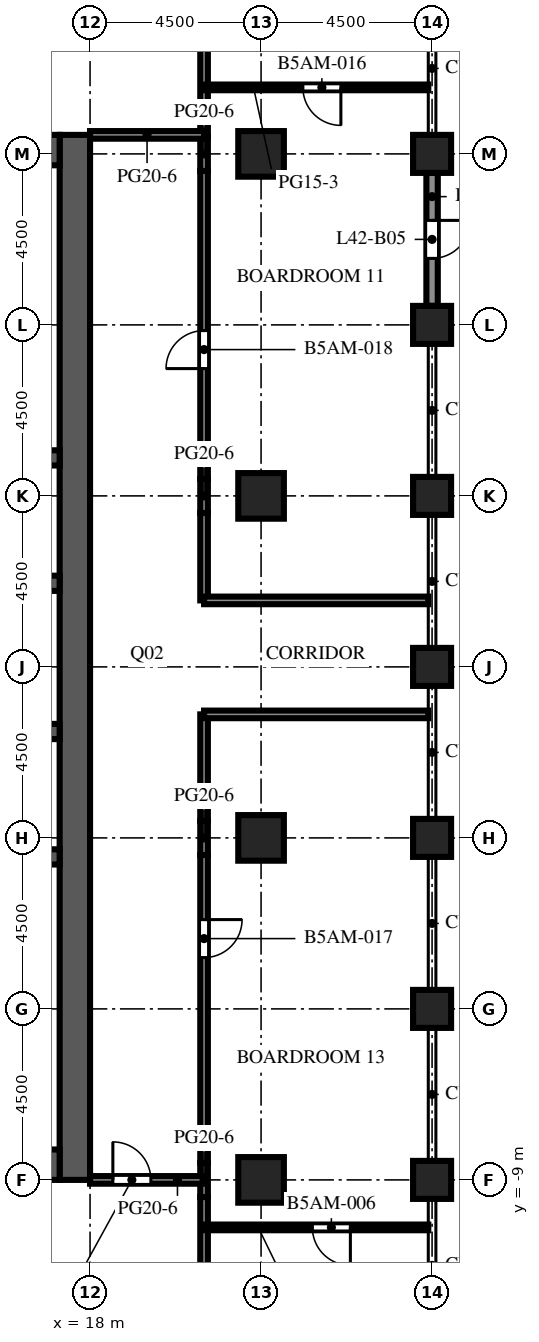
"""IFC4 building model, lengths in metres.
Left out: names, types, materials, properties, quantities, classifications, styles, units other than length and angle.
Written with IfcOpenShell. Run it as: python <this file> out.ifc"""

import sys

from ifc_helpers import new_model, si_unit, direction, frame, frame_2d, origin, origin_2d, place, context, subcontext, project, spatial, rectangle, extrude, element, fill, save


model = new_model("IFC4")
c1 = context("Model", 3, precision=1e-05, world=origin(), true_north=direction((0.0, 1.0)))
c2 = subcontext(c1, "Body", "Model", "MODEL_VIEW")
j1 = project(units=[si_unit("LENGTHUNIT", "METRE"), si_unit("PLANEANGLEUNIT", "RADIAN")], contexts=[c1])
p1 = place(None, origin())
s1 = spatial("IfcSite", under=j1, at=p1, CompositionType="ELEMENT")
p2 = place(p1, origin())
s2 = spatial("IfcBuilding", under=s1, at=p2, CompositionType="ELEMENT")
p3 = place(p2, frame((0.0, 0.0, 185.5)))
s3 = spatial("IfcBuildingStorey", under=s2, at=p3, CompositionType="ELEMENT", Elevation=185.5)
p4 = place(p3, frame((27.0, -9.0, 0.0), z_axis=(0.0, 0.0, 1.0), x_axis=(1.0, 0.0, 0.0)))
e1 = element("IfcColumn", 1, at=p4, inside=s3, PredefinedType="COLUMN", context=c2, shape_type="SweptSolid", body=[
    extrude(rectangle(XDim=1.0, YDim=1.0, at=origin_2d()), origin(), (0.0, 0.0, 1.0), 5.55),
])
p5 = place(p3, frame((27.0, -4.5, 0.0), z_axis=(0.0, 0.0, 1.0), x_axis=(1.0, 0.0, 0.0)))
e2 = element("IfcColumn", 2, at=p5, inside=s3, PredefinedType="COLUMN", context=c2, shape_type="SweptSolid", body=[
    extrude(rectangle(XDim=1.0, YDim=1.0, at=origin_2d()), origin(), (0.0, 0.0, 1.0), 6.0),
])
p6 = place(p3, frame((27.0, 0.0, 0.0), z_axis=(0.0, 0.0, 1.0), x_axis=(1.0, 0.0, 0.0)))
e3 = element("IfcColumn", 3, at=p6, inside=s3, PredefinedType="COLUMN", context=c2, shape_type="SweptSolid", body=[
    extrude(rectangle(XDim=1.0, YDim=1.0, at=origin_2d()), origin(), (0.0, 0.0, 1.0), 5.55),
])
p7 = place(p3, frame((27.0, 4.5, 0.0), z_axis=(0.0, 0.0, 1.0), x_axis=(1.0, 0.0, 0.0)))
e4 = element("IfcColumn", 4, at=p7, inside=s3, PredefinedType="COLUMN", context=c2, shape_type="SweptSolid", body=[
    extrude(rectangle(XDim=1.0, YDim=1.0, at=origin_2d()), origin(), (0.0, 0.0, 1.0), 6.0),
])
p8 = place(p3, frame((27.0, 9.0, 0.0), z_axis=(0.0, 0.0, 1.0), x_axis=(1.0, 0.0, 0.0)))
e5 = element("IfcColumn", 5, at=p8, inside=s3, PredefinedType="COLUMN", context=c2, shape_type="SweptSolid", body=[
    extrude(rectangle(XDim=1.0, YDim=1.0, at=origin_2d()), origin(), (0.0, 0.0, 1.0), 5.55),
])
p9 = place(p3, frame((27.0, 13.5, 0.0), z_axis=(0.0, 0.0, 1.0), x_axis=(1.0, 0.0, 0.0)))
e6 = element("IfcColumn", 6, at=p9, inside=s3, PredefinedType="COLUMN", context=c2, shape_type="SweptSolid", body=[
    extrude(rectangle(XDim=1.0, YDim=1.0, at=origin_2d()), origin(), (0.0, 0.0, 1.0), 6.0),
])
p10 = place(p3, frame((27.0, 18.0, 0.0), z_axis=(0.0, 0.0, 1.0), x_axis=(1.0, 0.0, 0.0)))
e7 = element("IfcColumn", 7, at=p10, inside=s3, PredefinedType="COLUMN", context=c2, shape_type="SweptSolid", body=[
    extrude(rectangle(XDim=1.0, YDim=1.0, at=origin_2d()), origin(), (0.0, 0.0, 1.0), 5.55),
])
for number, where, z_axis, x_axis in (
    (8, (22.5, -9.0, 0.0), (0.0, 0.0, 1.0), (1.0, 0.0, 0.0)),
    (9, (22.5, 0.0, 0.0), (0.0, 0.0, 1.0), (1.0, 0.0, 0.0)),
    (10, (22.5, 9.0, 0.0), (0.0, 0.0, 1.0), (1.0, 0.0, 0.0)),
    (11, (22.5, 18.0, 0.0), (0.0, 0.0, 1.0), (1.0, 0.0, 0.0)),
):
    element("IfcColumn", number, at=place(p3, frame(where, z_axis=z_axis, x_axis=x_axis)), inside=s3, PredefinedType="COLUMN", context=c2, shape_type="SweptSolid", body=[
        extrude(rectangle(XDim=1.2, YDim=1.2, at=origin_2d()), origin(), (0.0, 0.0, 1.0), 5.55),
    ])
p11 = place(p3, frame((17.6, -9.0, 0.0), z_axis=(0.0, 0.0, 1.0), x_axis=(0.0, 1.0, 0.0)))
e12 = element("IfcWall", 12, at=p11, inside=s3, PredefinedType="SHEAR", context=c2, shape_type="SweptSolid", body=[
    extrude(rectangle(XDim=27.5, YDim=0.8, at=frame_2d((13.75, 0.0))), origin(), (0.0, 0.0, 1.0), 6.0),
])
p12 = place(p11, frame((12.55, 0.0, 0.0)))
e13 = element("IfcOpeningElement", 13, at=p12, cuts=e12, PredefinedType="OPENING", context=c2, shape_type="SweptSolid", body=[
    extrude(rectangle(XDim=2.4, YDim=2.4, at=frame_2d((1.2, 1.2))), frame((0.0, 0.41, 0.0), z_axis=(0.0, -1.0, 0.0), x_axis=(1.0, 0.0, 0.0)), (0.0, 0.0, 1.0), 0.82),
])
p13 = place(p11, frame((6.825, 0.0, 0.0)))
e14 = element("IfcOpeningElement", 14, at=p13, cuts=e12, PredefinedType="OPENING", context=c2, shape_type="SweptSolid", body=[
    extrude(rectangle(XDim=1.2, YDim=2.1, at=frame_2d((0.6, 1.05))), frame((0.0, 0.41, 0.0), z_axis=(0.0, -1.0, 0.0), x_axis=(1.0, 0.0, 0.0)), (0.0, 0.0, 1.0), 0.82),
])
p14 = place(p11, frame((19.475, 0.0, 0.0)))
e15 = element("IfcOpeningElement", 15, at=p14, cuts=e12, PredefinedType="OPENING", context=c2, shape_type="SweptSolid", body=[
    extrude(rectangle(XDim=1.2, YDim=2.1, at=frame_2d((0.6, 1.05))), frame((0.0, 0.41, 0.0), z_axis=(0.0, -1.0, 0.0), x_axis=(1.0, 0.0, 0.0)), (0.0, 0.0, 1.0), 0.82),
])
for number, where, z_axis, x_axis in (
    (16, (6.8, -8.6, 0.0), (0.0, 0.0, 1.0), (1.0, 0.0, 0.0)),
    (17, (6.8, 18.1, 0.0), (0.0, 0.0, 1.0), (1.0, 0.0, 0.0)),
):
    element("IfcWall", number, at=place(p3, frame(where, z_axis=z_axis, x_axis=x_axis)), inside=s3, PredefinedType="SHEAR", context=c2, shape_type="SweptSolid", body=[
        extrude(rectangle(XDim=10.4, YDim=0.8, at=frame_2d((5.2, 0.0))), origin(), (0.0, 0.0, 1.0), 6.0),
    ])
p15 = place(p3, frame((6.8, -0.5, 0.0), z_axis=(0.0, 0.0, 1.0), x_axis=(1.0, 0.0, 0.0)))
e18 = element("IfcWall", 18, at=p15, inside=s3, PredefinedType="SHEAR", context=c2, shape_type="SweptSolid", body=[
    extrude(rectangle(XDim=10.4, YDim=0.4, at=frame_2d((5.2, 0.0))), origin(), (0.0, 0.0, 1.0), 6.0),
])
p16 = place(p3, frame((6.8, 2.8, 0.0), z_axis=(0.0, 0.0, 1.0), x_axis=(1.0, 0.0, 0.0)))
e19 = element("IfcWall", 19, at=p16, inside=s3, PredefinedType="SHEAR", context=c2, shape_type="SweptSolid", body=[
    extrude(rectangle(XDim=10.4, YDim=0.4, at=frame_2d((5.2, 0.0))), origin(), (0.0, 0.0, 1.0), 6.0),
])
p17 = place(p16, frame((0.738, 0.0, 0.0)))
e20 = element("IfcOpeningElement", 20, at=p17, cuts=e19, PredefinedType="OPENING", context=c2, shape_type="SweptSolid", body=[
    extrude(rectangle(XDim=1.1, YDim=2.1, at=frame_2d((0.55, 1.05))), frame((0.0, 0.21, 0.0), z_axis=(0.0, -1.0, 0.0), x_axis=(1.0, 0.0, 0.0)), (0.0, 0.0, 1.0), 0.42),
])
p18 = place(p16, frame((3.337, 0.0, 0.0)))
e21 = element("IfcOpeningElement", 21, at=p18, cuts=e19, PredefinedType="OPENING", context=c2, shape_type="SweptSolid", body=[
    extrude(rectangle(XDim=1.1, YDim=2.1, at=frame_2d((0.55, 1.05))), frame((0.0, 0.21, 0.0), z_axis=(0.0, -1.0, 0.0), x_axis=(1.0, 0.0, 0.0)), (0.0, 0.0, 1.0), 0.42),
])
p19 = place(p16, frame((6.012, 0.0, 0.0)))
e22 = element("IfcOpeningElement", 22, at=p19, cuts=e19, PredefinedType="OPENING", context=c2, shape_type="SweptSolid", body=[
    extrude(rectangle(XDim=1.0, YDim=2.1, at=frame_2d((0.5, 1.05))), frame((0.0, 0.21, 0.0), z_axis=(0.0, -1.0, 0.0), x_axis=(1.0, 0.0, 0.0)), (0.0, 0.0, 1.0), 0.42),
])
p20 = place(p16, frame((8.613, 0.0, 0.0)))
e23 = element("IfcOpeningElement", 23, at=p20, cuts=e19, PredefinedType="OPENING", context=c2, shape_type="SweptSolid", body=[
    extrude(rectangle(XDim=1.0, YDim=2.1, at=frame_2d((0.5, 1.05))), frame((0.0, 0.21, 0.0), z_axis=(0.0, -1.0, 0.0), x_axis=(1.0, 0.0, 0.0)), (0.0, 0.0, 1.0), 0.42),
])
p21 = place(p3, frame((6.8, 6.7, 0.0), z_axis=(0.0, 0.0, 1.0), x_axis=(1.0, 0.0, 0.0)))
e24 = element("IfcWall", 24, at=p21, inside=s3, PredefinedType="SHEAR", context=c2, shape_type="SweptSolid", body=[
    extrude(rectangle(XDim=10.4, YDim=0.4, at=frame_2d((5.2, 0.0))), origin(), (0.0, 0.0, 1.0), 6.0),
])
p22 = place(p21, frame((3.337, 0.0, 0.0)))
e25 = element("IfcOpeningElement", 25, at=p22, cuts=e24, PredefinedType="OPENING", context=c2, shape_type="SweptSolid", body=[
    extrude(rectangle(XDim=1.1, YDim=2.1, at=frame_2d((0.55, 1.05))), frame((0.0, 0.21, 0.0), z_axis=(0.0, -1.0, 0.0), x_axis=(1.0, 0.0, 0.0)), (0.0, 0.0, 1.0), 0.42),
])
p23 = place(p21, frame((5.962, 0.0, 0.0)))
e26 = element("IfcOpeningElement", 26, at=p23, cuts=e24, PredefinedType="OPENING", context=c2, shape_type="SweptSolid", body=[
    extrude(rectangle(XDim=1.1, YDim=2.1, at=frame_2d((0.55, 1.05))), frame((0.0, 0.21, 0.0), z_axis=(0.0, -1.0, 0.0), x_axis=(1.0, 0.0, 0.0)), (0.0, 0.0, 1.0), 0.42),
])
p24 = place(p21, frame((8.663, 0.0, 0.0)))
e27 = element("IfcOpeningElement", 27, at=p24, cuts=e24, PredefinedType="OPENING", context=c2, shape_type="SweptSolid", body=[
    extrude(rectangle(XDim=1.1, YDim=2.1, at=frame_2d((0.55, 1.05))), frame((0.0, 0.21, 0.0), z_axis=(0.0, -1.0, 0.0), x_axis=(1.0, 0.0, 0.0)), (0.0, 0.0, 1.0), 0.42),
])
p25 = place(p21, frame((0.688, 0.0, 0.0)))
e28 = element("IfcOpeningElement", 28, at=p25, cuts=e24, PredefinedType="OPENING", context=c2, shape_type="SweptSolid", body=[
    extrude(rectangle(XDim=1.0, YDim=2.1, at=frame_2d((0.5, 1.05))), frame((0.0, 0.21, 0.0), z_axis=(0.0, -1.0, 0.0), x_axis=(1.0, 0.0, 0.0)), (0.0, 0.0, 1.0), 0.42),
])
p26 = place(p3, frame((6.8, 10.0, 0.0), z_axis=(0.0, 0.0, 1.0), x_axis=(1.0, 0.0, 0.0)))
e29 = element("IfcWall", 29, at=p26, inside=s3, PredefinedType="SHEAR", context=c2, shape_type="SweptSolid", body=[
    extrude(rectangle(XDim=10.4, YDim=0.4, at=frame_2d((5.2, 0.0))), origin(), (0.0, 0.0, 1.0), 6.0),
])
p27 = place(p3, frame((27.0, 17.5, 0.0), z_axis=(0.0, 0.0, 1.0), x_axis=(0.0, -1.0, 0.0)))
e30 = element("IfcWall", 30, at=p27, inside=s3, PredefinedType="SOLIDWALL", context=c2, shape_type="SweptSolid", body=[
    extrude(rectangle(XDim=3.5, YDim=0.3, at=frame_2d((1.75, 0.0))), origin(), (0.0, 0.0, 1.0), 3.75),
])
p28 = place(p27, frame((1.25, 0.0, 0.0)))
e31 = element("IfcOpeningElement", 31, at=p28, cuts=e30, PredefinedType="OPENING", context=c2, shape_type="SweptSolid", body=[
    extrude(rectangle(XDim=1.0, YDim=2.2, at=frame_2d((0.5, 1.1))), frame((0.0, 0.16, 0.0), z_axis=(0.0, -1.0, 0.0), x_axis=(1.0, 0.0, 0.0)), (0.0, 0.0, 1.0), 0.32),
])
p29 = place(p3, frame((21.0, -17.55, 0.0), z_axis=(0.0, 0.0, 1.0), x_axis=(0.0, 1.0, 0.0)))
e32 = element("IfcWall", 32, at=p29, inside=s3, PredefinedType="PARTITIONING", context=c2, shape_type="SweptSolid", body=[
    extrude(rectangle(XDim=8.1, YDim=0.2, at=frame_2d((4.05, 0.0))), origin(), (0.0, 0.0, 1.0), 5.55),
])
p30 = place(p3, frame((21.0, -9.45, 0.0), z_axis=(0.0, 0.0, 1.0), x_axis=(0.0, 1.0, 0.0)))
e33 = element("IfcWall", 33, at=p30, inside=s3, PredefinedType="PARTITIONING", context=c2, shape_type="SweptSolid", body=[
    extrude(rectangle(XDim=0.9, YDim=0.2, at=frame_2d((0.45, 0.0))), origin(), (0.0, 0.0, 1.0), 3.72),
])
p31 = place(p3, frame((21.0, -0.45, 0.0), z_axis=(0.0, 0.0, 1.0), x_axis=(0.0, -1.0, 0.0)))
e34 = element("IfcWall", 34, at=p31, inside=s3, PredefinedType="PARTITIONING", context=c2, shape_type="SweptSolid", body=[
    extrude(rectangle(XDim=8.1, YDim=0.2, at=frame_2d((4.05, 0.0))), origin(), (0.0, 0.0, 1.0), 5.55),
])
p32 = place(p31, frame((1.7, 0.0, 0.0)))
e35 = element("IfcOpeningElement", 35, at=p32, cuts=e34, PredefinedType="OPENING", context=c2, shape_type="SweptSolid", body=[
    extrude(rectangle(XDim=1.0, YDim=2.1, at=frame_2d((0.5, 1.05))), frame((0.0, 0.11, 0.0), z_axis=(0.0, -1.0, 0.0), x_axis=(1.0, 0.0, 0.0)), (0.0, 0.0, 1.0), 0.22),
])
p33 = place(p3, frame((21.0, -0.45, 0.0), z_axis=(0.0, 0.0, 1.0), x_axis=(0.0, 1.0, 0.0)))
e36 = element("IfcWall", 36, at=p33, inside=s3, PredefinedType="PARTITIONING", context=c2, shape_type="SweptSolid", body=[
    extrude(rectangle(XDim=0.9, YDim=0.2, at=frame_2d((0.45, 0.0))), origin(), (0.0, 0.0, 1.0), 3.72),
])
p34 = place(p3, frame((21.0, 0.45, 0.0), z_axis=(0.0, 0.0, 1.0), x_axis=(0.0, 1.0, 0.0)))
e37 = element("IfcWall", 37, at=p34, inside=s3, PredefinedType="PARTITIONING", context=c2, shape_type="SweptSolid", body=[
    extrude(rectangle(XDim=2.8, YDim=0.2, at=frame_2d((1.4, 0.0))), origin(), (0.0, 0.0, 1.0), 5.55),
])
p35 = place(p3, frame((21.0, 6.25, 0.0), z_axis=(0.0, 0.0, 1.0), x_axis=(0.0, 1.0, 0.0)))
e38 = element("IfcWall", 38, at=p35, inside=s3, PredefinedType="PARTITIONING", context=c2, shape_type="SweptSolid", body=[
    extrude(rectangle(XDim=2.3, YDim=0.2, at=frame_2d((1.15, 0.0))), origin(), (0.0, 0.0, 1.0), 5.55),
])
p36 = place(p3, frame((21.0, 8.55, 0.0), z_axis=(0.0, 0.0, 1.0), x_axis=(0.0, 1.0, 0.0)))
e39 = element("IfcWall", 39, at=p36, inside=s3, PredefinedType="PARTITIONING", context=c2, shape_type="SweptSolid", body=[
    extrude(rectangle(XDim=0.9, YDim=0.2, at=frame_2d((0.45, 0.0))), origin(), (0.0, 0.0, 1.0), 3.72),
])
p37 = place(p3, frame((21.0, 17.55, 0.0), z_axis=(0.0, 0.0, 1.0), x_axis=(0.0, -1.0, 0.0)))
e40 = element("IfcWall", 40, at=p37, inside=s3, PredefinedType="PARTITIONING", context=c2, shape_type="SweptSolid", body=[
    extrude(rectangle(XDim=8.1, YDim=0.2, at=frame_2d((4.05, 0.0))), origin(), (0.0, 0.0, 1.0), 5.55),
])
p38 = place(p37, frame((4.2, 0.0, 0.0)))
e41 = element("IfcOpeningElement", 41, at=p38, cuts=e40, PredefinedType="OPENING", context=c2, shape_type="SweptSolid", body=[
    extrude(rectangle(XDim=1.0, YDim=2.1, at=frame_2d((0.5, 1.05))), frame((0.0, 0.11, 0.0), z_axis=(0.0, -1.0, 0.0), x_axis=(1.0, 0.0, 0.0)), (0.0, 0.0, 1.0), 0.22),
])
p39 = place(p3, frame((21.0, 17.55, 0.0), z_axis=(0.0, 0.0, 1.0), x_axis=(0.0, 1.0, 0.0)))
e42 = element("IfcWall", 42, at=p39, inside=s3, PredefinedType="PARTITIONING", context=c2, shape_type="SweptSolid", body=[
    extrude(rectangle(XDim=0.9, YDim=0.2, at=frame_2d((0.45, 0.0))), origin(), (0.0, 0.0, 1.0), 3.72),
])
p40 = place(p3, frame((21.0, 18.45, 0.0), z_axis=(0.0, 0.0, 1.0), x_axis=(0.0, 1.0, 0.0)))
e43 = element("IfcWall", 43, at=p40, inside=s3, PredefinedType="PARTITIONING", context=c2, shape_type="SweptSolid", body=[
    extrude(rectangle(XDim=8.45, YDim=0.2, at=frame_2d((4.225, 0.0))), origin(), (0.0, 0.0, 1.0), 5.55),
])
p41 = place(p3, frame((26.9, -10.25, 0.0), z_axis=(0.0, 0.0, 1.0), x_axis=(-1.0, 0.0, 0.0)))
e44 = element("IfcWall", 44, at=p41, inside=s3, PredefinedType="PARTITIONING", context=c2, shape_type="SweptSolid", body=[
    extrude(rectangle(XDim=5.9, YDim=0.15, at=frame_2d((2.95, 0.0))), origin(), (0.0, 0.0, 1.0), 5.55),
])
p42 = place(p41, frame((2.05, 0.0, 0.0)))
e45 = element("IfcOpeningElement", 45, at=p42, cuts=e44, PredefinedType="OPENING", context=c2, shape_type="SweptSolid", body=[
    extrude(rectangle(XDim=1.0, YDim=2.1, at=frame_2d((0.5, 1.05))), frame((0.0, 0.085, 0.0), z_axis=(0.0, -1.0, 0.0), x_axis=(1.0, 0.0, 0.0)), (0.0, 0.0, 1.0), 0.17),
])
p43 = place(p3, frame((21.0, -9.0, 0.0), z_axis=(0.0, 0.0, 1.0), x_axis=(-1.0, 0.0, 0.0)))
e46 = element("IfcWall", 46, at=p43, inside=s3, PredefinedType="PARTITIONING", context=c2, shape_type="SweptSolid", body=[
    extrude(rectangle(XDim=3.0, YDim=0.2, at=frame_2d((1.5, 0.0))), origin(), (0.0, 0.0, 1.0), 3.72),
])
p44 = place(p43, frame((1.4, 0.0, 0.0)))
e47 = element("IfcOpeningElement", 47, at=p44, cuts=e46, PredefinedType="OPENING", context=c2, shape_type="SweptSolid", body=[
    extrude(rectangle(XDim=1.0, YDim=2.1, at=frame_2d((0.5, 1.05))), frame((0.0, 0.11, 0.0), z_axis=(0.0, -1.0, 0.0), x_axis=(1.0, 0.0, 0.0)), (0.0, 0.0, 1.0), 0.22),
])
for number, where, z_axis, x_axis in (
    (48, (21.0, 3.25, 0.0), (0.0, 0.0, 1.0), (1.0, 0.0, 0.0)),
    (49, (21.0, 6.25, 0.0), (0.0, 0.0, 1.0), (1.0, 0.0, 0.0)),
):
    element("IfcWall", number, at=place(p3, frame(where, z_axis=z_axis, x_axis=x_axis)), inside=s3, PredefinedType="PARTITIONING", context=c2, shape_type="SweptSolid", body=[
        extrude(rectangle(XDim=5.9, YDim=0.2, at=frame_2d((2.95, 0.0))), origin(), (0.0, 0.0, 1.0), 5.55),
    ])
p45 = place(p3, frame((18.0, 18.5, 0.0), z_axis=(0.0, 0.0, 1.0), x_axis=(1.0, 0.0, 0.0)))
e50 = element("IfcWall", 50, at=p45, inside=s3, PredefinedType="PARTITIONING", context=c2, shape_type="SweptSolid", body=[
    extrude(rectangle(XDim=3.0, YDim=0.2, at=frame_2d((1.5, 0.0))), origin(), (0.0, 0.0, 1.0), 3.72),
])
p46 = place(p3, frame((21.0, 19.75, 0.0), z_axis=(0.0, 0.0, 1.0), x_axis=(1.0, 0.0, 0.0)))
e51 = element("IfcWall", 51, at=p46, inside=s3, PredefinedType="PARTITIONING", context=c2, shape_type="SweptSolid", body=[
    extrude(rectangle(XDim=5.9, YDim=0.15, at=frame_2d((2.95, 0.0))), origin(), (0.0, 0.0, 1.0), 5.55),
])
p47 = place(p46, frame((2.6, 0.0, 0.0)))
e52 = element("IfcOpeningElement", 52, at=p47, cuts=e51, PredefinedType="OPENING", context=c2, shape_type="SweptSolid", body=[
    extrude(rectangle(XDim=1.0, YDim=2.1, at=frame_2d((0.5, 1.05))), frame((0.0, 0.085, 0.0), z_axis=(0.0, -1.0, 0.0), x_axis=(1.0, 0.0, 0.0)), (0.0, 0.0, 1.0), 0.17),
])
p48 = place(p28, origin())
e53 = element("IfcDoor", 53, at=p48, inside=s3, OperationType="SINGLE_SWING_LEFT", PredefinedType="DOOR", context=c2, shape_type="SweptSolid", body=[
    extrude(rectangle(XDim=1.0, YDim=2.2, at=frame_2d((0.5, 1.1))), frame((0.0, 0.025, 0.0), z_axis=(0.0, -1.0, 0.0), x_axis=(1.0, 0.0, 0.0)), (0.0, 0.0, 1.0), 0.05),
])
fill(e31, e53)
p49 = place(p12, origin())
e54 = element("IfcDoor", 54, at=p49, inside=s3, OperationType="DOUBLE_DOOR_DOUBLE_SWING", PredefinedType="DOOR", context=c2, shape_type="SweptSolid", body=[
    extrude(rectangle(XDim=2.4, YDim=2.4, at=frame_2d((1.2, 1.2))), frame((0.0, 0.025, 0.0), z_axis=(0.0, -1.0, 0.0), x_axis=(1.0, 0.0, 0.0)), (0.0, 0.0, 1.0), 0.05),
])
fill(e13, e54)
p50 = place(p13, frame((1.2, 0.0, 0.0), z_axis=(0.0, 0.0, 1.0), x_axis=(-1.0, 0.0, 0.0)))
e55 = element("IfcDoor", 55, at=p50, inside=s3, OperationType="SINGLE_SWING_LEFT", PredefinedType="DOOR", context=c2, shape_type="SweptSolid", body=[
    extrude(rectangle(XDim=1.2, YDim=2.1, at=frame_2d((0.6, 1.05))), frame((0.0, 0.025, 0.0), z_axis=(0.0, -1.0, 0.0), x_axis=(1.0, 0.0, 0.0)), (0.0, 0.0, 1.0), 0.05),
])
fill(e14, e55)
p51 = place(p14, frame((1.2, 0.0, 0.0), z_axis=(0.0, 0.0, 1.0), x_axis=(-1.0, 0.0, 0.0)))
e56 = element("IfcDoor", 56, at=p51, inside=s3, OperationType="SINGLE_SWING_LEFT", PredefinedType="DOOR", context=c2, shape_type="SweptSolid", body=[
    extrude(rectangle(XDim=1.2, YDim=2.1, at=frame_2d((0.6, 1.05))), frame((0.0, 0.025, 0.0), z_axis=(0.0, -1.0, 0.0), x_axis=(1.0, 0.0, 0.0)), (0.0, 0.0, 1.0), 0.05),
])
fill(e15, e56)
p52 = place(p42, origin())
e57 = element("IfcDoor", 57, at=p52, inside=s3, OperationType="SINGLE_SWING_LEFT", PredefinedType="DOOR", context=c2, shape_type="SweptSolid", body=[
    extrude(rectangle(XDim=1.0, YDim=2.1, at=frame_2d((0.5, 1.05))), frame((0.0, 0.025, 0.0), z_axis=(0.0, -1.0, 0.0), x_axis=(1.0, 0.0, 0.0)), (0.0, 0.0, 1.0), 0.05),
])
fill(e45, e57)
p53 = place(p44, origin())
e58 = element("IfcDoor", 58, at=p53, inside=s3, OperationType="SINGLE_SWING_RIGHT", PredefinedType="DOOR", context=c2, shape_type="SweptSolid", body=[
    extrude(rectangle(XDim=1.0, YDim=2.1, at=frame_2d((0.5, 1.05))), frame((0.0, 0.025, 0.0), z_axis=(0.0, -1.0, 0.0), x_axis=(1.0, 0.0, 0.0)), (0.0, 0.0, 1.0), 0.05),
])
fill(e47, e58)
p54 = place(p47, origin())
e59 = element("IfcDoor", 59, at=p54, inside=s3, OperationType="SINGLE_SWING_RIGHT", PredefinedType="DOOR", context=c2, shape_type="SweptSolid", body=[
    extrude(rectangle(XDim=1.0, YDim=2.1, at=frame_2d((0.5, 1.05))), frame((0.0, 0.025, 0.0), z_axis=(0.0, -1.0, 0.0), x_axis=(1.0, 0.0, 0.0)), (0.0, 0.0, 1.0), 0.05),
])
fill(e52, e59)
p55 = place(p32, origin())
e60 = element("IfcDoor", 60, at=p55, inside=s3, OperationType="SINGLE_SWING_LEFT", PredefinedType="DOOR", context=c2, shape_type="SweptSolid", body=[
    extrude(rectangle(XDim=1.0, YDim=2.1, at=frame_2d((0.5, 1.05))), frame((0.0, 0.025, 0.0), z_axis=(0.0, -1.0, 0.0), x_axis=(1.0, 0.0, 0.0)), (0.0, 0.0, 1.0), 0.05),
])
fill(e35, e60)
p56 = place(p38, origin())
e61 = element("IfcDoor", 61, at=p56, inside=s3, OperationType="SINGLE_SWING_RIGHT", PredefinedType="DOOR", context=c2, shape_type="SweptSolid", body=[
    extrude(rectangle(XDim=1.0, YDim=2.1, at=frame_2d((0.5, 1.05))), frame((0.0, 0.025, 0.0), z_axis=(0.0, -1.0, 0.0), x_axis=(1.0, 0.0, 0.0)), (0.0, 0.0, 1.0), 0.05),
])
fill(e41, e61)
save(model, sys.argv[1])
